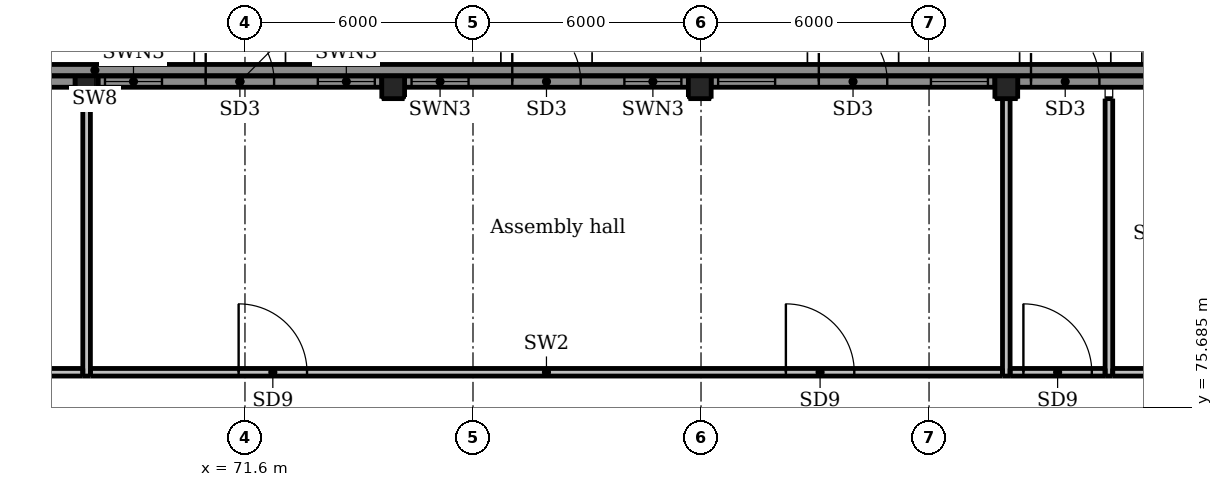
"""IFC4 building model, lengths in metres.
Left out: names, types, materials, properties, quantities, classifications, styles, units other than length and angle.
Written with IfcOpenShell. Run it as: python <this file> out.ifc"""

import sys

from ifc_helpers import new_model, si_unit, direction, frame, frame_2d, origin, origin_2d, place, context, subcontext, project, spatial, rectangle, extrude, element, fill, save


model = new_model("IFC4")
c1 = context("Model", 3, precision=1e-05, world=origin(), true_north=direction((0.0, 1.0)))
c2 = subcontext(c1, "Body", "Model", "MODEL_VIEW")
j1 = project(units=[si_unit("LENGTHUNIT", "METRE"), si_unit("PLANEANGLEUNIT", "RADIAN")], contexts=[c1])
p1 = place(None, origin())
s1 = spatial("IfcSite", under=j1, at=p1, CompositionType="ELEMENT")
p2 = place(p1, origin())
s2 = spatial("IfcBuilding", under=s1, at=p2, CompositionType="ELEMENT")
p3 = place(p2, origin())
s3 = spatial("IfcBuildingStorey", under=s2, at=p3, CompositionType="ELEMENT", Elevation=0.0)
for number, where, z_axis, x_axis in (
    (1, (67.433, 84.1, -0.3), (0.0, 0.0, 1.0), (1.0, 0.0, 0.0)),
    (2, (75.5, 84.1, -0.3), (0.0, 0.0, 1.0), (1.0, 0.0, 0.0)),
    (3, (83.567, 84.1, -0.3), (0.0, 0.0, 1.0), (1.0, 0.0, 0.0)),
    (4, (91.633, 84.1, -0.3), (0.0, 0.0, 1.0), (1.0, 0.0, 0.0)),
):
    element("IfcColumn", number, at=place(p3, frame(where, z_axis=z_axis, x_axis=x_axis)), inside=s3, PredefinedType="COLUMN", context=c2, shape_type="SweptSolid", body=[
        extrude(rectangle(XDim=0.6, YDim=0.6, at=origin_2d()), origin(), (0.0, 0.0, 1.0), 5.5),
    ])
p4 = place(p3, frame((59.667, 84.25, 0.0), z_axis=(0.0, 0.0, 1.0), x_axis=(1.0, 0.0, 0.0)))
e5 = element("IfcWall", 5, at=p4, inside=s3, PredefinedType="SOLIDWALL", context=c2, shape_type="SweptSolid", body=[
    extrude(rectangle(XDim=7.466, YDim=0.3, at=frame_2d((3.733, 0.0))), origin(), (0.0, 0.0, 1.0), 4.3),
])
p5 = place(p4, frame((0.45, 0.0, 0.0)))
e6 = element("IfcOpeningElement", 6, at=p5, cuts=e5, PredefinedType="OPENING", context=c2, shape_type="SweptSolid", body=[
    extrude(rectangle(XDim=1.8, YDim=2.1, at=frame_2d((0.9, 1.05))), frame((0.0, 0.16, 0.0), z_axis=(0.0, -1.0, 0.0), x_axis=(1.0, 0.0, 0.0)), (0.0, 0.0, 1.0), 0.32),
])
p6 = place(p3, frame((67.733, 84.25, 0.0), z_axis=(0.0, 0.0, 1.0), x_axis=(1.0, 0.0, 0.0)))
e7 = element("IfcWall", 7, at=p6, inside=s3, PredefinedType="SOLIDWALL", context=c2, shape_type="SweptSolid", body=[
    extrude(rectangle(XDim=7.467, YDim=0.3, at=frame_2d((3.733, 0.0))), origin(), (0.0, 0.0, 1.0), 4.3),
])
p7 = place(p6, frame((2.833, 0.0, 0.0)))
e8 = element("IfcOpeningElement", 8, at=p7, cuts=e7, PredefinedType="OPENING", context=c2, shape_type="SweptSolid", body=[
    extrude(rectangle(XDim=1.8, YDim=2.1, at=frame_2d((0.9, 1.05))), frame((0.0, 0.16, 0.0), z_axis=(0.0, -1.0, 0.0), x_axis=(1.0, 0.0, 0.0)), (0.0, 0.0, 1.0), 0.32),
])
p8 = place(p6, frame((0.184, 0.0, 2.6)))
e9 = element("IfcOpeningElement", 9, at=p8, cuts=e7, PredefinedType="OPENING", context=c2, shape_type="SweptSolid", body=[
    extrude(rectangle(XDim=1.5, YDim=1.2, at=frame_2d((0.75, 0.6))), frame((0.0, 0.16, 0.0), z_axis=(0.0, -1.0, 0.0), x_axis=(1.0, 0.0, 0.0)), (0.0, 0.0, 1.0), 0.32),
])
p9 = place(p6, frame((5.783, 0.0, 2.6)))
e10 = element("IfcOpeningElement", 10, at=p9, cuts=e7, PredefinedType="OPENING", context=c2, shape_type="SweptSolid", body=[
    extrude(rectangle(XDim=1.5, YDim=1.2, at=frame_2d((0.75, 0.6))), frame((0.0, 0.16, 0.0), z_axis=(0.0, -1.0, 0.0), x_axis=(1.0, 0.0, 0.0)), (0.0, 0.0, 1.0), 0.32),
])
p10 = place(p3, frame((75.8, 84.25, 0.0), z_axis=(0.0, 0.0, 1.0), x_axis=(1.0, 0.0, 0.0)))
e11 = element("IfcWall", 11, at=p10, inside=s3, PredefinedType="SOLIDWALL", context=c2, shape_type="SweptSolid", body=[
    extrude(rectangle(XDim=7.467, YDim=0.3, at=frame_2d((3.733, 0.0))), origin(), (0.0, 0.0, 1.0), 4.3),
])
p11 = place(p10, frame((2.833, 0.0, 0.0)))
e12 = element("IfcOpeningElement", 12, at=p11, cuts=e11, PredefinedType="OPENING", context=c2, shape_type="SweptSolid", body=[
    extrude(rectangle(XDim=1.8, YDim=2.1, at=frame_2d((0.9, 1.05))), frame((0.0, 0.16, 0.0), z_axis=(0.0, -1.0, 0.0), x_axis=(1.0, 0.0, 0.0)), (0.0, 0.0, 1.0), 0.32),
])
p12 = place(p10, frame((0.184, 0.0, 2.6)))
e13 = element("IfcOpeningElement", 13, at=p12, cuts=e11, PredefinedType="OPENING", context=c2, shape_type="SweptSolid", body=[
    extrude(rectangle(XDim=1.5, YDim=1.2, at=frame_2d((0.75, 0.6))), frame((0.0, 0.16, 0.0), z_axis=(0.0, -1.0, 0.0), x_axis=(1.0, 0.0, 0.0)), (0.0, 0.0, 1.0), 0.32),
])
p13 = place(p10, frame((5.783, 0.0, 2.6)))
e14 = element("IfcOpeningElement", 14, at=p13, cuts=e11, PredefinedType="OPENING", context=c2, shape_type="SweptSolid", body=[
    extrude(rectangle(XDim=1.5, YDim=1.2, at=frame_2d((0.75, 0.6))), frame((0.0, 0.16, 0.0), z_axis=(0.0, -1.0, 0.0), x_axis=(1.0, 0.0, 0.0)), (0.0, 0.0, 1.0), 0.32),
])
p14 = place(p3, frame((83.867, 84.25, 0.0), z_axis=(0.0, 0.0, 1.0), x_axis=(1.0, 0.0, 0.0)))
e15 = element("IfcWall", 15, at=p14, inside=s3, PredefinedType="SOLIDWALL", context=c2, shape_type="SweptSolid", body=[
    extrude(rectangle(XDim=7.466, YDim=0.3, at=frame_2d((3.733, 0.0))), origin(), (0.0, 0.0, 1.0), 4.3),
])
p15 = place(p14, frame((2.833, 0.0, 0.0)))
e16 = element("IfcOpeningElement", 16, at=p15, cuts=e15, PredefinedType="OPENING", context=c2, shape_type="SweptSolid", body=[
    extrude(rectangle(XDim=1.8, YDim=2.1, at=frame_2d((0.9, 1.05))), frame((0.0, 0.16, 0.0), z_axis=(0.0, -1.0, 0.0), x_axis=(1.0, 0.0, 0.0)), (0.0, 0.0, 1.0), 0.32),
])
p16 = place(p14, frame((0.183, 0.0, 2.6)))
e17 = element("IfcOpeningElement", 17, at=p16, cuts=e15, PredefinedType="OPENING", context=c2, shape_type="SweptSolid", body=[
    extrude(rectangle(XDim=1.5, YDim=1.2, at=frame_2d((0.75, 0.6))), frame((0.0, 0.16, 0.0), z_axis=(0.0, -1.0, 0.0), x_axis=(1.0, 0.0, 0.0)), (0.0, 0.0, 1.0), 0.32),
])
p17 = place(p14, frame((5.783, 0.0, 2.6)))
e18 = element("IfcOpeningElement", 18, at=p17, cuts=e15, PredefinedType="OPENING", context=c2, shape_type="SweptSolid", body=[
    extrude(rectangle(XDim=1.5, YDim=1.2, at=frame_2d((0.75, 0.6))), frame((0.0, 0.16, 0.0), z_axis=(0.0, -1.0, 0.0), x_axis=(1.0, 0.0, 0.0)), (0.0, 0.0, 1.0), 0.32),
])
p18 = place(p3, frame((91.933, 84.25, 0.0), z_axis=(0.0, 0.0, 1.0), x_axis=(1.0, 0.0, 0.0)))
e19 = element("IfcWall", 19, at=p18, inside=s3, PredefinedType="SOLIDWALL", context=c2, shape_type="SweptSolid", body=[
    extrude(rectangle(XDim=7.467, YDim=0.3, at=frame_2d((3.733, 0.0))), origin(), (0.0, 0.0, 1.0), 4.3),
])
p19 = place(p18, frame((0.35, 0.0, 0.0)))
e20 = element("IfcOpeningElement", 20, at=p19, cuts=e19, PredefinedType="OPENING", context=c2, shape_type="SweptSolid", body=[
    extrude(rectangle(XDim=1.8, YDim=2.1, at=frame_2d((0.9, 1.05))), frame((0.0, 0.16, 0.0), z_axis=(0.0, -1.0, 0.0), x_axis=(1.0, 0.0, 0.0)), (0.0, 0.0, 1.0), 0.32),
])
p20 = place(p18, frame((3.567, 0.0, 0.0)))
e21 = element("IfcOpeningElement", 21, at=p20, cuts=e19, PredefinedType="OPENING", context=c2, shape_type="SweptSolid", body=[
    extrude(rectangle(XDim=3.0, YDim=2.0, at=frame_2d((1.5, 1.0))), frame((0.0, 0.16, 0.0), z_axis=(0.0, -1.0, 0.0), x_axis=(1.0, 0.0, 0.0)), (0.0, 0.0, 1.0), 0.32),
])
p21 = place(p3, frame((35.3, 84.55, -0.3), z_axis=(0.0, 0.0, 1.0), x_axis=(1.0, 0.0, 0.0)))
e22 = element("IfcWall", 22, at=p21, inside=s3, PredefinedType="SOLIDWALL", context=c2, shape_type="SweptSolid", body=[
    extrude(rectangle(XDim=64.7, YDim=0.3, at=frame_2d((32.35, 0.0))), origin(), (0.0, 0.0, 1.0), 0.3),
])
p22 = place(p3, frame((62.167, 76.6, 0.0), z_axis=(0.0, 0.0, 1.0), x_axis=(1.0, 0.0, 0.0)))
e23 = element("IfcWall", 23, at=p22, inside=s3, PredefinedType="PARTITIONING", context=c2, shape_type="SweptSolid", body=[
    extrude(rectangle(XDim=5.166, YDim=0.2, at=frame_2d((2.583, 0.0))), origin(), (0.0, 0.0, 1.0), 4.1),
])
p23 = place(p22, frame((2.083, 0.0, 0.0)))
e24 = element("IfcOpeningElement", 24, at=p23, cuts=e23, PredefinedType="OPENING", context=c2, shape_type="SweptSolid", body=[
    extrude(rectangle(XDim=1.0, YDim=2.1, at=frame_2d((0.5, 1.05))), frame((0.0, 0.11, 0.0), z_axis=(0.0, -1.0, 0.0), x_axis=(1.0, 0.0, 0.0)), (0.0, 0.0, 1.0), 0.22),
])
p24 = place(p3, frame((67.533, 76.6, 0.0), z_axis=(0.0, 0.0, 1.0), x_axis=(1.0, 0.0, 0.0)))
e25 = element("IfcWall", 25, at=p24, inside=s3, PredefinedType="PARTITIONING", context=c2, shape_type="SweptSolid", body=[
    extrude(rectangle(XDim=24.0, YDim=0.2, at=frame_2d((12.0, 0.0))), origin(), (0.0, 0.0, 1.0), 4.1),
])
p25 = place(p24, frame((3.9, 0.0, 0.0)))
e26 = element("IfcOpeningElement", 26, at=p25, cuts=e25, PredefinedType="OPENING", context=c2, shape_type="SweptSolid", body=[
    extrude(rectangle(XDim=1.8, YDim=2.1, at=frame_2d((0.9, 1.05))), frame((0.0, 0.11, 0.0), z_axis=(0.0, -1.0, 0.0), x_axis=(1.0, 0.0, 0.0)), (0.0, 0.0, 1.0), 0.22),
])
p26 = place(p24, frame((18.3, 0.0, 0.0)))
e27 = element("IfcOpeningElement", 27, at=p26, cuts=e25, PredefinedType="OPENING", context=c2, shape_type="SweptSolid", body=[
    extrude(rectangle(XDim=1.8, YDim=2.1, at=frame_2d((0.9, 1.05))), frame((0.0, 0.11, 0.0), z_axis=(0.0, -1.0, 0.0), x_axis=(1.0, 0.0, 0.0)), (0.0, 0.0, 1.0), 0.22),
])
p27 = place(p3, frame((94.433, 76.6, 0.0), z_axis=(0.0, 0.0, 1.0), x_axis=(1.0, 0.0, 0.0)))
e28 = element("IfcWall", 28, at=p27, inside=s3, PredefinedType="PARTITIONING", context=c2, shape_type="SweptSolid", body=[
    extrude(rectangle(XDim=5.167, YDim=0.2, at=frame_2d((2.583, 0.0))), origin(), (0.0, 0.0, 1.0), 4.1),
])
p28 = place(p27, frame((2.083, 0.0, 0.0)))
e29 = element("IfcOpeningElement", 29, at=p28, cuts=e28, PredefinedType="OPENING", context=c2, shape_type="SweptSolid", body=[
    extrude(rectangle(XDim=1.0, YDim=2.1, at=frame_2d((0.5, 1.05))), frame((0.0, 0.11, 0.0), z_axis=(0.0, -1.0, 0.0), x_axis=(1.0, 0.0, 0.0)), (0.0, 0.0, 1.0), 0.22),
])
for number, where, z_axis, x_axis in (
    (30, (67.433, 76.5, 0.0), (0.0, 0.0, 1.0), (0.0, 1.0, 0.0)),
    (31, (91.633, 76.5, 0.0), (0.0, 0.0, 1.0), (0.0, 1.0, 0.0)),
    (32, (94.333, 76.5, 0.0), (0.0, 0.0, 1.0), (0.0, 1.0, 0.0)),
):
    element("IfcWall", number, at=place(p3, frame(where, z_axis=z_axis, x_axis=x_axis)), inside=s3, PredefinedType="PARTITIONING", context=c2, shape_type="SweptSolid", body=[
        extrude(rectangle(XDim=7.3, YDim=0.2, at=frame_2d((3.65, 0.0))), origin(), (0.0, 0.0, 1.0), 4.1),
    ])
p29 = place(p3, frame((91.733, 76.6, 0.0), z_axis=(0.0, 0.0, 1.0), x_axis=(1.0, 0.0, 0.0)))
e33 = element("IfcWall", 33, at=p29, inside=s3, PredefinedType="PARTITIONING", context=c2, shape_type="SweptSolid", body=[
    extrude(rectangle(XDim=2.5, YDim=0.2, at=frame_2d((1.25, 0.0))), origin(), (0.0, 0.0, 1.0), 4.1),
])
p30 = place(p29, frame((0.35, 0.0, 0.0)))
e34 = element("IfcOpeningElement", 34, at=p30, cuts=e33, PredefinedType="OPENING", context=c2, shape_type="SweptSolid", body=[
    extrude(rectangle(XDim=1.8, YDim=2.1, at=frame_2d((0.9, 1.05))), frame((0.0, 0.11, 0.0), z_axis=(0.0, -1.0, 0.0), x_axis=(1.0, 0.0, 0.0)), (0.0, 0.0, 1.0), 0.22),
])
p31 = place(p7, origin())
e35 = element("IfcDoor", 35, at=p31, inside=s3, OperationType="DOUBLE_DOOR_SINGLE_SWING", PredefinedType="DOOR", context=c2, shape_type="SweptSolid", body=[
    extrude(rectangle(XDim=1.8, YDim=2.1, at=frame_2d((0.9, 1.05))), frame((0.0, 0.025, 0.0), z_axis=(0.0, -1.0, 0.0), x_axis=(1.0, 0.0, 0.0)), (0.0, 0.0, 1.0), 0.05),
])
fill(e8, e35)
p32 = place(p8, origin())
e36 = element("IfcWindow", 36, at=p32, inside=s3, PartitioningType="SINGLE_PANEL", PredefinedType="WINDOW", context=c2, shape_type="SweptSolid", body=[
    extrude(rectangle(XDim=1.5, YDim=1.2, at=frame_2d((0.75, 0.6))), frame((0.0, 0.03, 0.0), z_axis=(0.0, -1.0, 0.0), x_axis=(1.0, 0.0, 0.0)), (0.0, 0.0, 1.0), 0.06),
])
fill(e9, e36)
p33 = place(p9, origin())
e37 = element("IfcWindow", 37, at=p33, inside=s3, PartitioningType="SINGLE_PANEL", PredefinedType="WINDOW", context=c2, shape_type="SweptSolid", body=[
    extrude(rectangle(XDim=1.5, YDim=1.2, at=frame_2d((0.75, 0.6))), frame((0.0, 0.03, 0.0), z_axis=(0.0, -1.0, 0.0), x_axis=(1.0, 0.0, 0.0)), (0.0, 0.0, 1.0), 0.06),
])
fill(e10, e37)
p34 = place(p11, origin())
e38 = element("IfcDoor", 38, at=p34, inside=s3, OperationType="DOUBLE_DOOR_SINGLE_SWING", PredefinedType="DOOR", context=c2, shape_type="SweptSolid", body=[
    extrude(rectangle(XDim=1.8, YDim=2.1, at=frame_2d((0.9, 1.05))), frame((0.0, 0.025, 0.0), z_axis=(0.0, -1.0, 0.0), x_axis=(1.0, 0.0, 0.0)), (0.0, 0.0, 1.0), 0.05),
])
fill(e12, e38)
p35 = place(p12, origin())
e39 = element("IfcWindow", 39, at=p35, inside=s3, PartitioningType="SINGLE_PANEL", PredefinedType="WINDOW", context=c2, shape_type="SweptSolid", body=[
    extrude(rectangle(XDim=1.5, YDim=1.2, at=frame_2d((0.75, 0.6))), frame((0.0, 0.03, 0.0), z_axis=(0.0, -1.0, 0.0), x_axis=(1.0, 0.0, 0.0)), (0.0, 0.0, 1.0), 0.06),
])
fill(e13, e39)
p36 = place(p13, origin())
e40 = element("IfcWindow", 40, at=p36, inside=s3, PartitioningType="SINGLE_PANEL", PredefinedType="WINDOW", context=c2, shape_type="SweptSolid", body=[
    extrude(rectangle(XDim=1.5, YDim=1.2, at=frame_2d((0.75, 0.6))), frame((0.0, 0.03, 0.0), z_axis=(0.0, -1.0, 0.0), x_axis=(1.0, 0.0, 0.0)), (0.0, 0.0, 1.0), 0.06),
])
fill(e14, e40)
p37 = place(p15, origin())
e41 = element("IfcDoor", 41, at=p37, inside=s3, OperationType="DOUBLE_DOOR_SINGLE_SWING", PredefinedType="DOOR", context=c2, shape_type="SweptSolid", body=[
    extrude(rectangle(XDim=1.8, YDim=2.1, at=frame_2d((0.9, 1.05))), frame((0.0, 0.025, 0.0), z_axis=(0.0, -1.0, 0.0), x_axis=(1.0, 0.0, 0.0)), (0.0, 0.0, 1.0), 0.05),
])
fill(e16, e41)
p38 = place(p16, origin())
e42 = element("IfcWindow", 42, at=p38, inside=s3, PartitioningType="SINGLE_PANEL", PredefinedType="WINDOW", context=c2, shape_type="SweptSolid", body=[
    extrude(rectangle(XDim=1.5, YDim=1.2, at=frame_2d((0.75, 0.6))), frame((0.0, 0.03, 0.0), z_axis=(0.0, -1.0, 0.0), x_axis=(1.0, 0.0, 0.0)), (0.0, 0.0, 1.0), 0.06),
])
fill(e17, e42)
p39 = place(p17, origin())
e43 = element("IfcWindow", 43, at=p39, inside=s3, PartitioningType="SINGLE_PANEL", PredefinedType="WINDOW", context=c2, shape_type="SweptSolid", body=[
    extrude(rectangle(XDim=1.5, YDim=1.2, at=frame_2d((0.75, 0.6))), frame((0.0, 0.03, 0.0), z_axis=(0.0, -1.0, 0.0), x_axis=(1.0, 0.0, 0.0)), (0.0, 0.0, 1.0), 0.06),
])
fill(e18, e43)
p40 = place(p19, origin())
e44 = element("IfcDoor", 44, at=p40, inside=s3, OperationType="DOUBLE_DOOR_SINGLE_SWING", PredefinedType="DOOR", context=c2, shape_type="SweptSolid", body=[
    extrude(rectangle(XDim=1.8, YDim=2.1, at=frame_2d((0.9, 1.05))), frame((0.0, 0.025, 0.0), z_axis=(0.0, -1.0, 0.0), x_axis=(1.0, 0.0, 0.0)), (0.0, 0.0, 1.0), 0.05),
])
fill(e20, e44)
p41 = place(p25, origin())
e45 = element("IfcDoor", 45, at=p41, inside=s3, OperationType="DOUBLE_DOOR_SINGLE_SWING", PredefinedType="DOOR", context=c2, shape_type="SweptSolid", body=[
    extrude(rectangle(XDim=1.8, YDim=2.1, at=frame_2d((0.9, 1.05))), frame((0.0, 0.025, 0.0), z_axis=(0.0, -1.0, 0.0), x_axis=(1.0, 0.0, 0.0)), (0.0, 0.0, 1.0), 0.05),
])
fill(e26, e45)
p42 = place(p26, origin())
e46 = element("IfcDoor", 46, at=p42, inside=s3, OperationType="DOUBLE_DOOR_SINGLE_SWING", PredefinedType="DOOR", context=c2, shape_type="SweptSolid", body=[
    extrude(rectangle(XDim=1.8, YDim=2.1, at=frame_2d((0.9, 1.05))), frame((0.0, 0.025, 0.0), z_axis=(0.0, -1.0, 0.0), x_axis=(1.0, 0.0, 0.0)), (0.0, 0.0, 1.0), 0.05),
])
fill(e27, e46)
p43 = place(p30, origin())
e47 = element("IfcDoor", 47, at=p43, inside=s3, OperationType="DOUBLE_DOOR_SINGLE_SWING", PredefinedType="DOOR", context=c2, shape_type="SweptSolid", body=[
    extrude(rectangle(XDim=1.8, YDim=2.1, at=frame_2d((0.9, 1.05))), frame((0.0, 0.025, 0.0), z_axis=(0.0, -1.0, 0.0), x_axis=(1.0, 0.0, 0.0)), (0.0, 0.0, 1.0), 0.05),
])
fill(e34, e47)
save(model, sys.argv[1])
